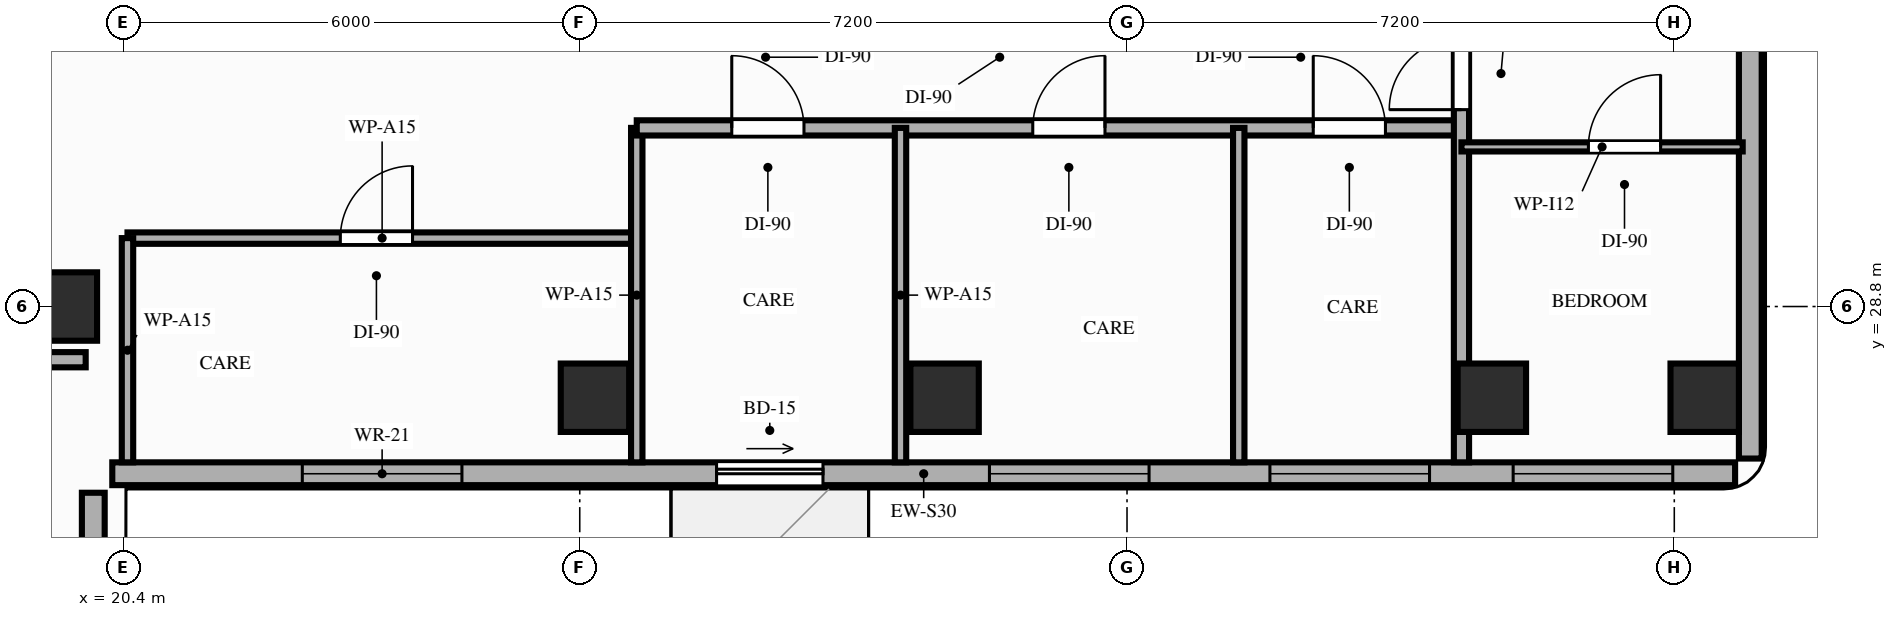
"""IFC4 building model, lengths in metres.
Left out: names, types, materials, properties, quantities, classifications, styles, units other than length and angle.
Written with IfcOpenShell. Run it as: python <this file> out.ifc"""

import sys

from ifc_helpers import new_model, si_unit, direction, frame, frame_2d, origin, origin_2d, place, context, subcontext, project, spatial, rectangle, extrude, element, fill, save


model = new_model("IFC4")
c1 = context("Model", 3, precision=1e-05, world=origin(), true_north=direction((0.0, 1.0)))
c2 = subcontext(c1, "Body", "Model", "MODEL_VIEW")
j1 = project(units=[si_unit("LENGTHUNIT", "METRE"), si_unit("PLANEANGLEUNIT", "RADIAN")], contexts=[c1])
p1 = place(None, origin())
s1 = spatial("IfcSite", under=j1, at=p1, CompositionType="ELEMENT")
p2 = place(p1, origin())
s2 = spatial("IfcBuilding", under=s1, at=p2, CompositionType="ELEMENT")
p3 = place(p2, frame((0.0, 0.0, 172.8)))
s3 = spatial("IfcBuildingStorey", under=s2, at=p3, CompositionType="ELEMENT", Elevation=172.8)
for number, where, z_axis, x_axis in (
    (1, (19.6, 28.8, 0.0), (0.0, 0.0, 1.0), (1.0, 0.0, 0.0)),
    (2, (26.6, 27.6, 0.0), (0.0, 0.0, 1.0), (1.0, 0.0, 0.0)),
    (3, (31.2, 27.6, 0.0), (0.0, 0.0, 1.0), (1.0, 0.0, 0.0)),
    (4, (38.4, 27.6, 0.0), (0.0, 0.0, 1.0), (1.0, 0.0, 0.0)),
    (5, (41.2, 27.6, 0.0), (0.0, 0.0, 1.0), (1.0, 0.0, 0.0)),
):
    element("IfcColumn", number, at=place(p3, frame(where, z_axis=z_axis, x_axis=x_axis)), inside=s3, PredefinedType="COLUMN", context=c2, shape_type="SweptSolid", body=[
        extrude(rectangle(XDim=0.9, YDim=0.9, at=origin_2d()), origin(), (0.0, 0.0, 1.0), 3.2),
    ])
p4 = place(p3, frame((20.0, 8.8, 0.0), z_axis=(0.0, 0.0, 1.0), x_axis=(0.0, 1.0, 0.0)))
e6 = element("IfcWall", 6, at=p4, inside=s3, PredefinedType="STANDARD", context=c2, shape_type="SweptSolid", body=[
    extrude(rectangle(XDim=17.55, YDim=0.3, at=frame_2d((8.775, 0.0))), origin(), (0.0, 0.0, 1.0), 2.45),
])
p5 = place(p4, frame((4.58, 0.0, 0.85)))
e7 = element("IfcOpeningElement", 7, at=p5, cuts=e6, PredefinedType="OPENING", context=c2, shape_type="SweptSolid", body=[
    extrude(rectangle(XDim=0.8, YDim=1.35, at=frame_2d((0.4, 0.675))), frame((0.0, 0.16, 0.0), z_axis=(0.0, -1.0, 0.0), x_axis=(1.0, 0.0, 0.0)), (0.0, 0.0, 1.0), 0.32),
])
p6 = place(p4, frame((5.95, 0.0, 0.85)))
e8 = element("IfcOpeningElement", 8, at=p6, cuts=e6, PredefinedType="OPENING", context=c2, shape_type="SweptSolid", body=[
    extrude(rectangle(XDim=1.5, YDim=1.35, at=frame_2d((0.75, 0.675))), frame((0.0, 0.16, 0.0), z_axis=(0.0, -1.0, 0.0), x_axis=(1.0, 0.0, 0.0)), (0.0, 0.0, 1.0), 0.32),
])
p7 = place(p4, frame((10.85, 0.0, 0.85)))
e9 = element("IfcOpeningElement", 9, at=p7, cuts=e6, PredefinedType="OPENING", context=c2, shape_type="SweptSolid", body=[
    extrude(rectangle(XDim=2.1, YDim=1.35, at=frame_2d((1.05, 0.675))), frame((0.0, 0.16, 0.0), z_axis=(0.0, -1.0, 0.0), x_axis=(1.0, 0.0, 0.0)), (0.0, 0.0, 1.0), 0.32),
])
p8 = place(p3, frame((20.25, 26.6, 0.0), z_axis=(0.0, 0.0, 1.0), x_axis=(1.0, 0.0, 0.0)))
e10 = element("IfcWall", 10, at=p8, inside=s3, PredefinedType="STANDARD", context=c2, shape_type="SweptSolid", body=[
    extrude(rectangle(XDim=21.35, YDim=0.3, at=frame_2d((10.675, 0.0))), origin(), (0.0, 0.0, 1.0), 2.71),
])
p9 = place(p8, frame((7.95, 0.0, 0.0)))
e11 = element("IfcOpeningElement", 11, at=p9, cuts=e10, PredefinedType="OPENING", context=c2, shape_type="SweptSolid", body=[
    extrude(rectangle(XDim=1.4, YDim=2.1, at=frame_2d((0.7, 1.05))), frame((0.0, 0.16, 0.0), z_axis=(0.0, -1.0, 0.0), x_axis=(1.0, 0.0, 0.0)), (0.0, 0.0, 1.0), 0.32),
])
p10 = place(p8, frame((2.5, 0.0, 0.85)))
e12 = element("IfcOpeningElement", 12, at=p10, cuts=e10, PredefinedType="OPENING", context=c2, shape_type="SweptSolid", body=[
    extrude(rectangle(XDim=2.1, YDim=1.61, at=frame_2d((1.05, 0.805))), frame((0.0, 0.16, 0.0), z_axis=(0.0, -1.0, 0.0), x_axis=(1.0, 0.0, 0.0)), (0.0, 0.0, 1.0), 0.32),
])
p11 = place(p8, frame((18.43, 0.0, 0.85)))
e13 = element("IfcOpeningElement", 13, at=p11, cuts=e10, PredefinedType="OPENING", context=c2, shape_type="SweptSolid", body=[
    extrude(rectangle(XDim=2.1, YDim=1.61, at=frame_2d((1.05, 0.805))), frame((0.0, 0.16, 0.0), z_axis=(0.0, -1.0, 0.0), x_axis=(1.0, 0.0, 0.0)), (0.0, 0.0, 1.0), 0.32),
])
p12 = place(p8, frame((11.54, 0.0, 0.85)))
e14 = element("IfcOpeningElement", 14, at=p12, cuts=e10, PredefinedType="OPENING", context=c2, shape_type="SweptSolid", body=[
    extrude(rectangle(XDim=2.1, YDim=1.61, at=frame_2d((1.05, 0.805))), frame((0.0, 0.16, 0.0), z_axis=(0.0, -1.0, 0.0), x_axis=(1.0, 0.0, 0.0)), (0.0, 0.0, 1.0), 0.32),
])
p13 = place(p8, frame((15.23, 0.0, 0.85)))
e15 = element("IfcOpeningElement", 15, at=p13, cuts=e10, PredefinedType="OPENING", context=c2, shape_type="SweptSolid", body=[
    extrude(rectangle(XDim=2.1, YDim=1.61, at=frame_2d((1.05, 0.805))), frame((0.0, 0.16, 0.0), z_axis=(0.0, -1.0, 0.0), x_axis=(1.0, 0.0, 0.0)), (0.0, 0.0, 1.0), 0.32),
])
p14 = place(p3, frame((41.8, 26.8, 0.0), z_axis=(0.0, 0.0, 1.0), x_axis=(0.0, 1.0, 0.0)))
e16 = element("IfcWall", 16, at=p14, inside=s3, PredefinedType="STANDARD", context=c2, shape_type="SweptSolid", body=[
    extrude(rectangle(XDim=15.35, YDim=0.3, at=frame_2d((7.675, 0.0))), origin(), (0.0, 0.0, 1.0), 3.02),
])
p15 = place(p14, frame((7.05, 0.0, 0.85)))
e17 = element("IfcOpeningElement", 17, at=p15, cuts=e16, PredefinedType="OPENING", context=c2, shape_type="SweptSolid", body=[
    extrude(rectangle(XDim=2.1, YDim=1.8, at=frame_2d((1.05, 0.9))), frame((0.0, 0.16, 0.0), z_axis=(0.0, -1.0, 0.0), x_axis=(1.0, 0.0, 0.0)), (0.0, 0.0, 1.0), 0.32),
])
p16 = place(p3, frame((12.91, 28.1, 0.0), z_axis=(0.0, 0.0, 1.0), x_axis=(1.0, 0.0, 0.0)))
e18 = element("IfcWall", 18, at=p16, inside=s3, PredefinedType="PARTITIONING", context=c2, shape_type="SweptSolid", body=[
    extrude(rectangle(XDim=6.99, YDim=0.2, at=frame_2d((3.495, 0.0))), origin(), (0.0, 0.0, 1.0), 2.45),
])
p17 = place(p3, frame((20.45, 29.7, 0.0), z_axis=(0.0, 0.0, 1.0), x_axis=(1.0, 0.0, 0.0)))
e19 = element("IfcWall", 19, at=p17, inside=s3, PredefinedType="PARTITIONING", context=c2, shape_type="SweptSolid", body=[
    extrude(rectangle(XDim=6.7, YDim=0.15, at=frame_2d((3.35, 0.0))), origin(), (0.0, 0.0, 1.0), 3.02),
])
p18 = place(p17, frame((2.8, 0.0, 0.0)))
e20 = element("IfcOpeningElement", 20, at=p18, cuts=e19, PredefinedType="OPENING", context=c2, shape_type="SweptSolid", body=[
    extrude(rectangle(XDim=0.95, YDim=2.15, at=frame_2d((0.475, 1.075))), frame((0.0, 0.085, 0.0), z_axis=(0.0, -1.0, 0.0), x_axis=(1.0, 0.0, 0.0)), (0.0, 0.0, 1.0), 0.17),
])
p19 = place(p3, frame((20.45, 26.75, 0.0), z_axis=(0.0, 0.0, 1.0), x_axis=(0.0, 1.0, 0.0)))
e21 = element("IfcWall", 21, at=p19, inside=s3, PredefinedType="PARTITIONING", context=c2, shape_type="SweptSolid", body=[
    extrude(rectangle(XDim=2.95, YDim=0.15, at=frame_2d((1.475, 0.0))), origin(), (0.0, 0.0, 1.0), 2.45),
])
p20 = place(p3, frame((27.15, 26.75, 0.0), z_axis=(0.0, 0.0, 1.0), x_axis=(0.0, 1.0, 0.0)))
e22 = element("IfcWall", 22, at=p20, inside=s3, PredefinedType="PARTITIONING", context=c2, shape_type="SweptSolid", body=[
    extrude(rectangle(XDim=4.4, YDim=0.15, at=frame_2d((2.2, 0.0))), origin(), (0.0, 0.0, 1.0), 2.45),
])
p21 = place(p3, frame((27.15, 31.15, 0.0), z_axis=(0.0, 0.0, 1.0), x_axis=(1.0, 0.0, 0.0)))
e23 = element("IfcWall", 23, at=p21, inside=s3, PredefinedType="PARTITIONING", context=c2, shape_type="SweptSolid", body=[
    extrude(rectangle(XDim=10.85, YDim=0.2, at=frame_2d((5.425, 0.0))), origin(), (0.0, 0.0, 1.0), 2.45),
])
p22 = place(p21, frame((1.25, 0.0, 0.0)))
e24 = element("IfcOpeningElement", 24, at=p22, cuts=e23, PredefinedType="OPENING", context=c2, shape_type="SweptSolid", body=[
    extrude(rectangle(XDim=0.95, YDim=2.15, at=frame_2d((0.475, 1.075))), frame((0.0, 0.11, 0.0), z_axis=(0.0, -1.0, 0.0), x_axis=(1.0, 0.0, 0.0)), (0.0, 0.0, 1.0), 0.22),
])
p23 = place(p21, frame((5.21, 0.0, 0.0)))
e25 = element("IfcOpeningElement", 25, at=p23, cuts=e23, PredefinedType="OPENING", context=c2, shape_type="SweptSolid", body=[
    extrude(rectangle(XDim=0.95, YDim=2.15, at=frame_2d((0.475, 1.075))), frame((0.0, 0.11, 0.0), z_axis=(0.0, -1.0, 0.0), x_axis=(1.0, 0.0, 0.0)), (0.0, 0.0, 1.0), 0.22),
])
p24 = place(p21, frame((8.9, 0.0, 0.0)))
e26 = element("IfcOpeningElement", 26, at=p24, cuts=e23, PredefinedType="OPENING", context=c2, shape_type="SweptSolid", body=[
    extrude(rectangle(XDim=0.95, YDim=2.15, at=frame_2d((0.475, 1.075))), frame((0.0, 0.11, 0.0), z_axis=(0.0, -1.0, 0.0), x_axis=(1.0, 0.0, 0.0)), (0.0, 0.0, 1.0), 0.22),
])
p25 = place(p3, frame((38.0, 26.75, 0.0), z_axis=(0.0, 0.0, 1.0), x_axis=(0.0, 1.0, 0.0)))
e27 = element("IfcWall", 27, at=p25, inside=s3, PredefinedType="PARTITIONING", context=c2, shape_type="SweptSolid", body=[
    extrude(rectangle(XDim=15.45, YDim=0.2, at=frame_2d((7.725, 0.0))), origin(), (0.0, 0.0, 1.0), 2.45),
])
p26 = place(p25, frame((4.64, 0.0, 0.0)))
e28 = element("IfcOpeningElement", 28, at=p26, cuts=e27, PredefinedType="OPENING", context=c2, shape_type="SweptSolid", body=[
    extrude(rectangle(XDim=0.95, YDim=2.15, at=frame_2d((0.475, 1.075))), frame((0.0, 0.11, 0.0), z_axis=(0.0, -1.0, 0.0), x_axis=(1.0, 0.0, 0.0)), (0.0, 0.0, 1.0), 0.22),
])
p27 = place(p3, frame((38.0, 30.9, 0.0), z_axis=(0.0, 0.0, 1.0), x_axis=(1.0, 0.0, 0.0)))
e29 = element("IfcWall", 29, at=p27, inside=s3, PredefinedType="PARTITIONING", context=c2, shape_type="SweptSolid", body=[
    extrude(rectangle(XDim=3.7, YDim=0.12, at=frame_2d((1.85, 0.0))), origin(), (0.0, 0.0, 1.0), 2.45),
])
p28 = place(p27, frame((1.67, 0.0, 0.0)))
e30 = element("IfcOpeningElement", 30, at=p28, cuts=e29, PredefinedType="OPENING", context=c2, shape_type="SweptSolid", body=[
    extrude(rectangle(XDim=0.95, YDim=2.15, at=frame_2d((0.475, 1.075))), frame((0.0, 0.07, 0.0), z_axis=(0.0, -1.0, 0.0), x_axis=(1.0, 0.0, 0.0)), (0.0, 0.0, 1.0), 0.14),
])
for number, where, z_axis, x_axis in (
    (31, (30.62, 26.75, 0.0), (0.0, 0.0, 1.0), (0.0, 1.0, 0.0)),
    (32, (35.07, 26.75, 0.0), (0.0, 0.0, 1.0), (0.0, 1.0, 0.0)),
):
    element("IfcWall", number, at=place(p3, frame(where, z_axis=z_axis, x_axis=x_axis)), inside=s3, PredefinedType="PARTITIONING", context=c2, shape_type="SweptSolid", body=[
        extrude(rectangle(XDim=4.4, YDim=0.15, at=frame_2d((2.2, 0.0))), origin(), (0.0, 0.0, 1.0), 2.45),
    ])
p29 = place(p9, origin())
e33 = element("IfcDoor", 33, at=p29, inside=s3, OperationType="SLIDING_TO_RIGHT", PredefinedType="DOOR", context=c2, shape_type="SweptSolid", body=[
    extrude(rectangle(XDim=1.4, YDim=2.1, at=frame_2d((0.7, 1.05))), frame((0.0, 0.025, 0.0), z_axis=(0.0, -1.0, 0.0), x_axis=(1.0, 0.0, 0.0)), (0.0, 0.0, 1.0), 0.05),
])
fill(e11, e33)
p30 = place(p10, origin())
e34 = element("IfcWindow", 34, at=p30, inside=s3, PartitioningType="SINGLE_PANEL", PredefinedType="WINDOW", context=c2, shape_type="SweptSolid", body=[
    extrude(rectangle(XDim=2.1, YDim=1.61, at=frame_2d((1.05, 0.805))), frame((0.0, 0.03, 0.0), z_axis=(0.0, -1.0, 0.0), x_axis=(1.0, 0.0, 0.0)), (0.0, 0.0, 1.0), 0.06),
])
fill(e12, e34)
p31 = place(p11, origin())
e35 = element("IfcWindow", 35, at=p31, inside=s3, PartitioningType="SINGLE_PANEL", PredefinedType="WINDOW", context=c2, shape_type="SweptSolid", body=[
    extrude(rectangle(XDim=2.1, YDim=1.61, at=frame_2d((1.05, 0.805))), frame((0.0, 0.03, 0.0), z_axis=(0.0, -1.0, 0.0), x_axis=(1.0, 0.0, 0.0)), (0.0, 0.0, 1.0), 0.06),
])
fill(e13, e35)
p32 = place(p12, origin())
e36 = element("IfcWindow", 36, at=p32, inside=s3, PartitioningType="SINGLE_PANEL", PredefinedType="WINDOW", context=c2, shape_type="SweptSolid", body=[
    extrude(rectangle(XDim=2.1, YDim=1.61, at=frame_2d((1.05, 0.805))), frame((0.0, 0.03, 0.0), z_axis=(0.0, -1.0, 0.0), x_axis=(1.0, 0.0, 0.0)), (0.0, 0.0, 1.0), 0.06),
])
fill(e14, e36)
p33 = place(p13, origin())
e37 = element("IfcWindow", 37, at=p33, inside=s3, PartitioningType="SINGLE_PANEL", PredefinedType="WINDOW", context=c2, shape_type="SweptSolid", body=[
    extrude(rectangle(XDim=2.1, YDim=1.61, at=frame_2d((1.05, 0.805))), frame((0.0, 0.03, 0.0), z_axis=(0.0, -1.0, 0.0), x_axis=(1.0, 0.0, 0.0)), (0.0, 0.0, 1.0), 0.06),
])
fill(e15, e37)
p34 = place(p18, origin())
e38 = element("IfcDoor", 38, at=p34, inside=s3, OperationType="SINGLE_SWING_RIGHT", PredefinedType="DOOR", context=c2, shape_type="SweptSolid", body=[
    extrude(rectangle(XDim=0.95, YDim=2.15, at=frame_2d((0.475, 1.075))), frame((0.0, 0.025, 0.0), z_axis=(0.0, -1.0, 0.0), x_axis=(1.0, 0.0, 0.0)), (0.0, 0.0, 1.0), 0.05),
])
fill(e20, e38)
p35 = place(p26, origin())
e39 = element("IfcDoor", 39, at=p35, inside=s3, OperationType="SINGLE_SWING_LEFT", PredefinedType="DOOR", context=c2, shape_type="SweptSolid", body=[
    extrude(rectangle(XDim=0.95, YDim=2.15, at=frame_2d((0.475, 1.075))), frame((0.0, 0.025, 0.0), z_axis=(0.0, -1.0, 0.0), x_axis=(1.0, 0.0, 0.0)), (0.0, 0.0, 1.0), 0.05),
])
fill(e28, e39)
p36 = place(p28, origin())
e40 = element("IfcDoor", 40, at=p36, inside=s3, OperationType="SINGLE_SWING_RIGHT", PredefinedType="DOOR", context=c2, shape_type="SweptSolid", body=[
    extrude(rectangle(XDim=0.95, YDim=2.15, at=frame_2d((0.475, 1.075))), frame((0.0, 0.025, 0.0), z_axis=(0.0, -1.0, 0.0), x_axis=(1.0, 0.0, 0.0)), (0.0, 0.0, 1.0), 0.05),
])
fill(e30, e40)
p37 = place(p22, origin())
e41 = element("IfcDoor", 41, at=p37, inside=s3, OperationType="SINGLE_SWING_LEFT", PredefinedType="DOOR", context=c2, shape_type="SweptSolid", body=[
    extrude(rectangle(XDim=0.95, YDim=2.15, at=frame_2d((0.475, 1.075))), frame((0.0, 0.025, 0.0), z_axis=(0.0, -1.0, 0.0), x_axis=(1.0, 0.0, 0.0)), (0.0, 0.0, 1.0), 0.05),
])
fill(e24, e41)
p38 = place(p23, origin())
e42 = element("IfcDoor", 42, at=p38, inside=s3, OperationType="SINGLE_SWING_RIGHT", PredefinedType="DOOR", context=c2, shape_type="SweptSolid", body=[
    extrude(rectangle(XDim=0.95, YDim=2.15, at=frame_2d((0.475, 1.075))), frame((0.0, 0.025, 0.0), z_axis=(0.0, -1.0, 0.0), x_axis=(1.0, 0.0, 0.0)), (0.0, 0.0, 1.0), 0.05),
])
fill(e25, e42)
p39 = place(p24, origin())
e43 = element("IfcDoor", 43, at=p39, inside=s3, OperationType="SINGLE_SWING_LEFT", PredefinedType="DOOR", context=c2, shape_type="SweptSolid", body=[
    extrude(rectangle(XDim=0.95, YDim=2.15, at=frame_2d((0.475, 1.075))), frame((0.0, 0.025, 0.0), z_axis=(0.0, -1.0, 0.0), x_axis=(1.0, 0.0, 0.0)), (0.0, 0.0, 1.0), 0.05),
])
fill(e26, e43)
save(model, sys.argv[1])
